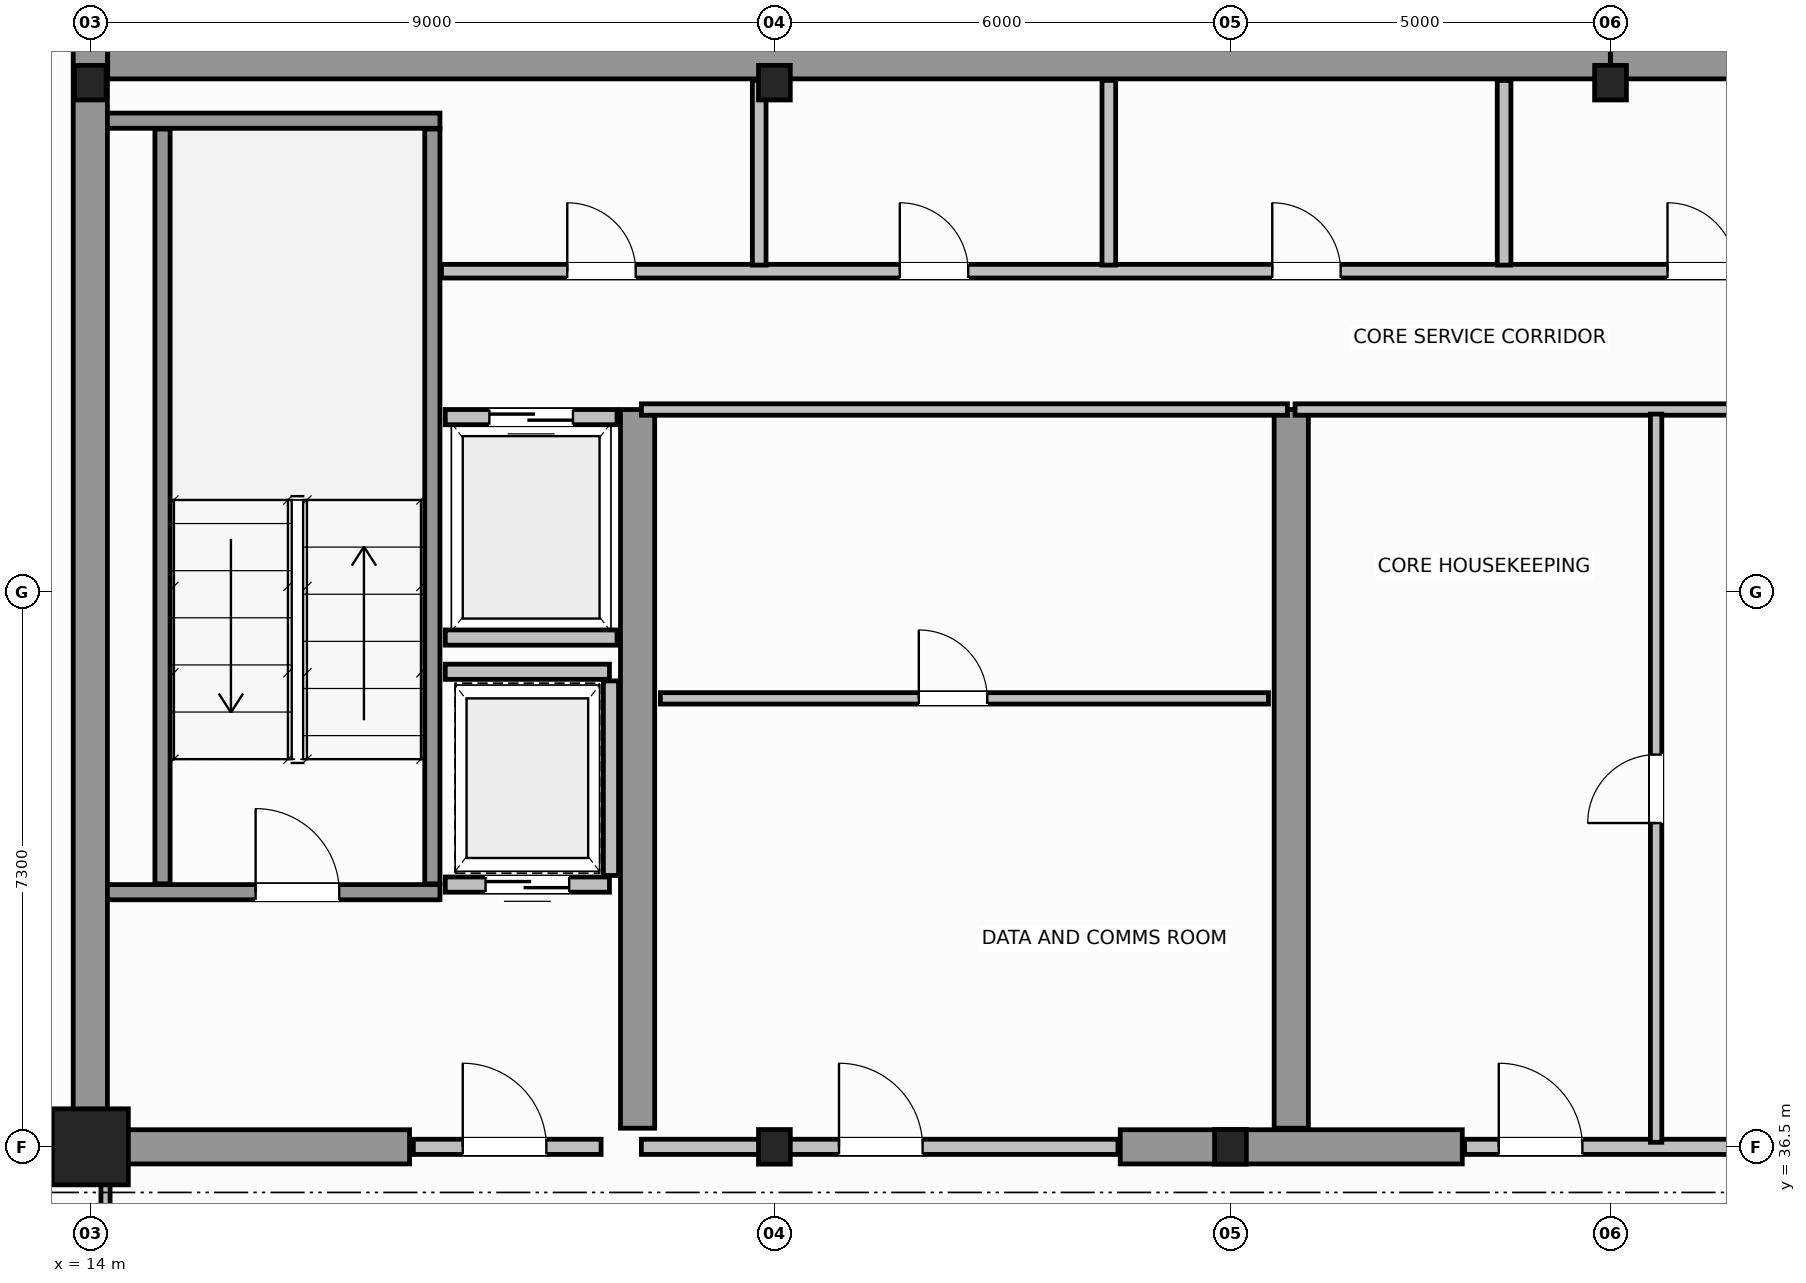
"""IFC4 building model, lengths in metres.
Left out: names, types, materials, properties, quantities, classifications, styles, units other than length and angle.
Written with IfcOpenShell. Run it as: python <this file> out.ifc"""

import sys

from ifc_helpers import new_model, si_unit, direction, frame, frame_2d, origin, origin_2d, place, context, subcontext, project, spatial, rectangle, i_section, extrude, source, transform, mapped, element, fill, save


model = new_model("IFC4")
c1 = context("Model", 3, precision=1e-05, world=origin(), true_north=direction((0.0, 1.0)))
c2 = subcontext(c1, "Body", "Model", "MODEL_VIEW")
j1 = project(units=[si_unit("LENGTHUNIT", "METRE"), si_unit("PLANEANGLEUNIT", "RADIAN")], contexts=[c1])
p1 = place(None, origin())
s1 = spatial("IfcSite", under=j1, at=p1, CompositionType="ELEMENT")
p2 = place(p1, origin())
s2 = spatial("IfcBuilding", under=s1, at=p2, CompositionType="ELEMENT")
p3 = place(p2, frame((0.0, 0.0, 249.8)))
s3 = spatial("IfcBuildingStorey", under=s2, at=p3, CompositionType="ELEMENT", Elevation=249.8)
m1 = source(origin(), c2, "Body", "SweptSolid", [
    extrude(rectangle(XDim=1.0, YDim=1.0, at=origin_2d()), origin(), (0.0, 0.0, 1.0), 3.8),
])
p4 = place(p3, frame((14.0, 36.5, 0.0), z_axis=(0.0, 0.0, 1.0), x_axis=(1.0, 0.0, 0.0)))
e1 = element("IfcColumn", 1, at=p4, inside=s3, PredefinedType="COLUMN", context=c2, shape_type="MappedRepresentation", body=[
    mapped(m1, transform((0.0, 0.0, 0.0), scale=1.0)),
])
m2 = source(origin(), c2, "Body", "SweptSolid", [
    extrude(i_section(OverallWidth=0.418, OverallDepth=0.455, WebThickness=0.042, FlangeThickness=0.058, FilletRadius=0.015, at=origin_2d()), origin(), (0.0, 0.0, 1.0), 3.8),
])
for number, where, z_axis, x_axis in (
    (2, (23.0, 36.5, 0.0), (0.0, 0.0, 1.0), (1.0, 0.0, 0.0)),
    (3, (29.0, 36.5, 0.0), (0.0, 0.0, 1.0), (1.0, 0.0, 0.0)),
    (4, (14.0, 50.5, 0.0), (0.0, 0.0, 1.0), (1.0, 0.0, 0.0)),
    (5, (23.0, 50.5, 0.0), (0.0, 0.0, 1.0), (1.0, 0.0, 0.0)),
    (6, (34.0, 50.5, 0.0), (0.0, 0.0, 1.0), (1.0, 0.0, 0.0)),
):
    element("IfcColumn", number, at=place(p3, frame(where, z_axis=z_axis, x_axis=x_axis)), inside=s3, PredefinedType="COLUMN", context=c2, shape_type="MappedRepresentation", body=[
        mapped(m2, transform((0.0, 0.0, 0.0), scale=1.0)),
    ])
for number, where, z_axis, x_axis in (
    (7, (14.229, 50.775, 0.0), (0.0, 0.0, 1.0), (1.0, 0.0, 0.0)),
    (8, (34.002, 50.775, 0.0), (0.0, 0.0, 1.0), (1.0, 0.0, 0.0)),
):
    element("IfcWall", number, at=place(p3, frame(where, z_axis=z_axis, x_axis=x_axis)), inside=s3, PredefinedType="SHEAR", context=c2, shape_type="SweptSolid", body=[
        extrude(rectangle(XDim=19.769, YDim=0.45, at=frame_2d((9.885, 0.0))), origin(), (0.0, 0.0, 1.0), 3.8),
    ])
p5 = place(p3, frame((14.0, 36.5, 0.0), z_axis=(0.0, 0.0, 1.0), x_axis=(0.0, 1.0, 0.0)))
e9 = element("IfcWall", 9, at=p5, inside=s3, PredefinedType="SHEAR", context=c2, shape_type="SweptSolid", body=[
    extrude(rectangle(XDim=14.5, YDim=0.45, at=frame_2d((7.25, 0.0))), origin(), (0.0, 0.0, 1.0), 3.8),
])
p6 = place(p3, frame((14.245, 36.5, 0.0), z_axis=(0.0, 0.0, 1.0), x_axis=(1.0, 0.0, 0.0)))
e10 = element("IfcWall", 10, at=p6, inside=s3, PredefinedType="SHEAR", context=c2, shape_type="SweptSolid", body=[
    extrude(rectangle(XDim=3.955, YDim=0.45, at=frame_2d((1.978, 0.0))), origin(), (0.0, 0.0, 1.0), 2.58),
])
p7 = place(p3, frame((27.55, 36.5, 0.0), z_axis=(0.0, 0.0, 1.0), x_axis=(1.0, 0.0, 0.0)))
e11 = element("IfcWall", 11, at=p7, inside=s3, PredefinedType="SHEAR", context=c2, shape_type="SweptSolid", body=[
    extrude(rectangle(XDim=4.5, YDim=0.45, at=frame_2d((2.25, 0.0))), origin(), (0.0, 0.0, 1.0), 3.8),
])
for number, where, z_axis, x_axis in (
    (12, (21.2, 36.745, 0.0), (0.0, 0.0, 1.0), (0.0, 1.0, 0.0)),
    (13, (29.8, 36.745, 0.0), (0.0, 0.0, 1.0), (0.0, 1.0, 0.0)),
):
    element("IfcWall", number, at=place(p3, frame(where, z_axis=z_axis, x_axis=x_axis)), inside=s3, PredefinedType="SHEAR", context=c2, shape_type="SweptSolid", body=[
        extrude(rectangle(XDim=9.455, YDim=0.45, at=frame_2d((4.728, 0.0))), origin(), (0.0, 0.0, 1.0), 3.8),
    ])
p8 = place(p3, frame((14.225, 39.85, 0.0), z_axis=(0.0, 0.0, 1.0), x_axis=(1.0, 0.0, 0.0)))
e14 = element("IfcWall", 14, at=p8, inside=s3, PredefinedType="SOLIDWALL", context=c2, shape_type="SweptSolid", body=[
    extrude(rectangle(XDim=4.375, YDim=0.2, at=frame_2d((2.188, 0.0))), origin(), (0.0, 0.0, 1.0), 3.8),
])
p9 = place(p8, frame((1.95, 0.0, 0.0)))
e15 = element("IfcOpeningElement", 15, at=p9, cuts=e14, PredefinedType="OPENING", context=c2, shape_type="SweptSolid", body=[
    extrude(rectangle(XDim=1.1, YDim=2.15, at=frame_2d((0.55, 1.075))), frame((0.0, 0.11, 0.0), z_axis=(0.0, -1.0, 0.0), x_axis=(1.0, 0.0, 0.0)), (0.0, 0.0, 1.0), 0.22),
])
p10 = place(p3, frame((14.225, 50.0, 0.0), z_axis=(0.0, 0.0, 1.0), x_axis=(1.0, 0.0, 0.0)))
e16 = element("IfcWall", 16, at=p10, inside=s3, PredefinedType="SOLIDWALL", context=c2, shape_type="SweptSolid", body=[
    extrude(rectangle(XDim=4.375, YDim=0.2, at=frame_2d((2.188, 0.0))), origin(), (0.0, 0.0, 1.0), 3.8),
])
for number, where, z_axis, x_axis in (
    (17, (14.95, 39.96, 0.0), (0.0, 0.0, 1.0), (0.0, 1.0, 0.0)),
    (18, (18.5, 39.96, 0.0), (0.0, 0.0, 1.0), (0.0, 1.0, 0.0)),
):
    element("IfcWall", number, at=place(p3, frame(where, z_axis=z_axis, x_axis=x_axis)), inside=s3, PredefinedType="SOLIDWALL", context=c2, shape_type="SweptSolid", body=[
        extrude(rectangle(XDim=9.93, YDim=0.2, at=frame_2d((4.965, 0.0))), origin(), (0.0, 0.0, 1.0), 3.8),
    ])
p11 = place(p3, frame((18.25, 36.5, 0.0), z_axis=(0.0, 0.0, 1.0), x_axis=(1.0, 0.0, 0.0)))
e19 = element("IfcWall", 19, at=p11, inside=s3, PredefinedType="SOLIDWALL", context=c2, shape_type="SweptSolid", body=[
    extrude(rectangle(XDim=2.47, YDim=0.2, at=frame_2d((1.235, 0.0))), origin(), (0.0, 0.0, 1.0), 2.57),
])
p12 = place(p11, frame((0.65, 0.0, 0.0)))
e20 = element("IfcOpeningElement", 20, at=p12, cuts=e19, PredefinedType="OPENING", context=c2, shape_type="SweptSolid", body=[
    extrude(rectangle(XDim=1.1, YDim=2.15, at=frame_2d((0.55, 1.075))), frame((0.0, 0.11, 0.0), z_axis=(0.0, -1.0, 0.0), x_axis=(1.0, 0.0, 0.0)), (0.0, 0.0, 1.0), 0.22),
])
p13 = place(p3, frame((18.67, 46.1, 0.0), z_axis=(0.0, 0.0, 1.0), x_axis=(1.0, 0.0, 0.0)))
e21 = element("IfcWall", 21, at=p13, inside=s3, PredefinedType="SOLIDWALL", context=c2, shape_type="SweptSolid", body=[
    extrude(rectangle(XDim=2.26, YDim=0.2, at=frame_2d((1.13, 0.0))), origin(), (0.0, 0.0, 1.0), 3.58),
])
p14 = place(p13, frame((0.58, 0.0, 0.0)))
e22 = element("IfcOpeningElement", 22, at=p14, cuts=e21, PredefinedType="OPENING", context=c2, shape_type="SweptSolid", body=[
    extrude(rectangle(XDim=1.1, YDim=2.15, at=frame_2d((0.55, 1.075))), frame((0.0, 0.11, 0.0), z_axis=(0.0, -1.0, 0.0), x_axis=(1.0, 0.0, 0.0)), (0.0, 0.0, 1.0), 0.22),
])
p15 = place(p3, frame((18.67, 43.2, 0.0), z_axis=(0.0, 0.0, 1.0), x_axis=(1.0, 0.0, 0.0)))
e23 = element("IfcWall", 23, at=p15, inside=s3, PredefinedType="SOLIDWALL", context=c2, shape_type="SweptSolid", body=[
    extrude(rectangle(XDim=2.26, YDim=0.2, at=frame_2d((1.13, 0.0))), origin(), (0.0, 0.0, 1.0), 3.58),
])
p16 = place(p3, frame((18.67, 39.95, 0.0), z_axis=(0.0, 0.0, 1.0), x_axis=(1.0, 0.0, 0.0)))
e24 = element("IfcWall", 24, at=p16, inside=s3, PredefinedType="SOLIDWALL", context=c2, shape_type="SweptSolid", body=[
    extrude(rectangle(XDim=2.16, YDim=0.2, at=frame_2d((1.08, 0.0))), origin(), (0.0, 0.0, 1.0), 3.58),
])
p17 = place(p16, frame((0.53, 0.0, 0.0)))
e25 = element("IfcOpeningElement", 25, at=p17, cuts=e24, PredefinedType="OPENING", context=c2, shape_type="SweptSolid", body=[
    extrude(rectangle(XDim=1.1, YDim=2.15, at=frame_2d((0.55, 1.075))), frame((0.0, 0.11, 0.0), z_axis=(0.0, -1.0, 0.0), x_axis=(1.0, 0.0, 0.0)), (0.0, 0.0, 1.0), 0.22),
])
p18 = place(p3, frame((18.67, 42.75, 0.0), z_axis=(0.0, 0.0, 1.0), x_axis=(1.0, 0.0, 0.0)))
e26 = element("IfcWall", 26, at=p18, inside=s3, PredefinedType="SOLIDWALL", context=c2, shape_type="SweptSolid", body=[
    extrude(rectangle(XDim=2.16, YDim=0.2, at=frame_2d((1.08, 0.0))), origin(), (0.0, 0.0, 1.0), 3.58),
])
p19 = place(p3, frame((20.85, 40.07, 0.0), z_axis=(0.0, 0.0, 1.0), x_axis=(0.0, 1.0, 0.0)))
e27 = element("IfcWall", 27, at=p19, inside=s3, PredefinedType="SOLIDWALL", context=c2, shape_type="SweptSolid", body=[
    extrude(rectangle(XDim=2.56, YDim=0.2, at=frame_2d((1.28, 0.0))), origin(), (0.0, 0.0, 1.0), 3.58),
])
p20 = place(p3, frame((21.25, 36.5, 0.0), z_axis=(0.0, 0.0, 1.0), x_axis=(1.0, 0.0, 0.0)))
e28 = element("IfcWall", 28, at=p20, inside=s3, PredefinedType="SOLIDWALL", context=c2, shape_type="SweptSolid", body=[
    extrude(rectangle(XDim=6.27, YDim=0.2, at=frame_2d((3.135, 0.0))), origin(), (0.0, 0.0, 1.0), 2.57),
])
p21 = place(p20, frame((2.6, 0.0, 0.0)))
e29 = element("IfcOpeningElement", 29, at=p21, cuts=e28, PredefinedType="OPENING", context=c2, shape_type="SweptSolid", body=[
    extrude(rectangle(XDim=1.1, YDim=2.15, at=frame_2d((0.55, 1.075))), frame((0.0, 0.11, 0.0), z_axis=(0.0, -1.0, 0.0), x_axis=(1.0, 0.0, 0.0)), (0.0, 0.0, 1.0), 0.22),
])
p22 = place(p3, frame((21.25, 46.2, 0.0), z_axis=(0.0, 0.0, 1.0), x_axis=(1.0, 0.0, 0.0)))
e30 = element("IfcWall", 30, at=p22, inside=s3, PredefinedType="PARTITIONING", context=c2, shape_type="SweptSolid", body=[
    extrude(rectangle(XDim=8.5, YDim=0.15, at=frame_2d((4.25, 0.0))), origin(), (0.0, 0.0, 1.0), 3.58),
])
p23 = place(p3, frame((21.5, 42.4, 0.0), z_axis=(0.0, 0.0, 1.0), x_axis=(1.0, 0.0, 0.0)))
e31 = element("IfcWall", 31, at=p23, inside=s3, PredefinedType="PARTITIONING", context=c2, shape_type="SweptSolid", body=[
    extrude(rectangle(XDim=8.0, YDim=0.15, at=frame_2d((4.0, 0.0))), origin(), (0.0, 0.0, 1.0), 3.58),
])
p24 = place(p23, frame((3.4, 0.0, 0.0)))
e32 = element("IfcOpeningElement", 32, at=p24, cuts=e31, PredefinedType="OPENING", context=c2, shape_type="SweptSolid", body=[
    extrude(rectangle(XDim=0.9, YDim=2.1, at=frame_2d((0.45, 1.05))), frame((0.0, 0.085, 0.0), z_axis=(0.0, -1.0, 0.0), x_axis=(1.0, 0.0, 0.0)), (0.0, 0.0, 1.0), 0.17),
])
p25 = place(p3, frame((32.08, 36.5, 0.0), z_axis=(0.0, 0.0, 1.0), x_axis=(1.0, 0.0, 0.0)))
e33 = element("IfcWall", 33, at=p25, inside=s3, PredefinedType="SOLIDWALL", context=c2, shape_type="SweptSolid", body=[
    extrude(rectangle(XDim=4.04, YDim=0.2, at=frame_2d((2.02, 0.0))), origin(), (0.0, 0.0, 1.0), 3.02),
])
p26 = place(p25, frame((0.45, 0.0, 0.0)))
e34 = element("IfcOpeningElement", 34, at=p26, cuts=e33, PredefinedType="OPENING", context=c2, shape_type="SweptSolid", body=[
    extrude(rectangle(XDim=1.1, YDim=2.15, at=frame_2d((0.55, 1.075))), frame((0.0, 0.11, 0.0), z_axis=(0.0, -1.0, 0.0), x_axis=(1.0, 0.0, 0.0)), (0.0, 0.0, 1.0), 0.22),
])
p27 = place(p3, frame((29.85, 46.2, 0.0), z_axis=(0.0, 0.0, 1.0), x_axis=(1.0, 0.0, 0.0)))
e35 = element("IfcWall", 35, at=p27, inside=s3, PredefinedType="PARTITIONING", context=c2, shape_type="SweptSolid", body=[
    extrude(rectangle(XDim=8.5, YDim=0.15, at=frame_2d((4.25, 0.0))), origin(), (0.0, 0.0, 1.0), 3.58),
])
p28 = place(p3, frame((34.6, 36.56, 0.0), z_axis=(0.0, 0.0, 1.0), x_axis=(0.0, 1.0, 0.0)))
e36 = element("IfcWall", 36, at=p28, inside=s3, PredefinedType="PARTITIONING", context=c2, shape_type="SweptSolid", body=[
    extrude(rectangle(XDim=9.58, YDim=0.15, at=frame_2d((4.79, 0.0))), origin(), (0.0, 0.0, 1.0), 3.58),
])
p29 = place(p28, frame((4.2, 0.0, 0.0)))
e37 = element("IfcOpeningElement", 37, at=p29, cuts=e36, PredefinedType="OPENING", context=c2, shape_type="SweptSolid", body=[
    extrude(rectangle(XDim=0.9, YDim=2.1, at=frame_2d((0.45, 1.05))), frame((0.0, 0.085, 0.0), z_axis=(0.0, -1.0, 0.0), x_axis=(1.0, 0.0, 0.0)), (0.0, 0.0, 1.0), 0.17),
])
p30 = place(p3, frame((18.62, 48.02, 0.0), z_axis=(0.0, 0.0, 1.0), x_axis=(1.0, 0.0, 0.0)))
e38 = element("IfcWall", 38, at=p30, inside=s3, PredefinedType="PLUMBINGWALL", context=c2, shape_type="SweptSolid", body=[
    extrude(rectangle(XDim=30.76, YDim=0.18, at=frame_2d((15.38, 0.0))), origin(), (0.0, 0.0, 1.0), 3.58),
])
p31 = place(p30, frame((1.655, 0.0, 0.0)))
e39 = element("IfcOpeningElement", 39, at=p31, cuts=e38, PredefinedType="OPENING", context=c2, shape_type="SweptSolid", body=[
    extrude(rectangle(XDim=0.9, YDim=2.15, at=frame_2d((0.45, 1.075))), frame((0.0, 0.1, 0.0), z_axis=(0.0, -1.0, 0.0), x_axis=(1.0, 0.0, 0.0)), (0.0, 0.0, 1.0), 0.2),
])
p32 = place(p30, frame((6.03, 0.0, 0.0)))
e40 = element("IfcOpeningElement", 40, at=p32, cuts=e38, PredefinedType="OPENING", context=c2, shape_type="SweptSolid", body=[
    extrude(rectangle(XDim=0.9, YDim=2.15, at=frame_2d((0.45, 1.075))), frame((0.0, 0.1, 0.0), z_axis=(0.0, -1.0, 0.0), x_axis=(1.0, 0.0, 0.0)), (0.0, 0.0, 1.0), 0.2),
])
p33 = place(p30, frame((10.93, 0.0, 0.0)))
e41 = element("IfcOpeningElement", 41, at=p33, cuts=e38, PredefinedType="OPENING", context=c2, shape_type="SweptSolid", body=[
    extrude(rectangle(XDim=0.9, YDim=2.15, at=frame_2d((0.45, 1.075))), frame((0.0, 0.1, 0.0), z_axis=(0.0, -1.0, 0.0), x_axis=(1.0, 0.0, 0.0)), (0.0, 0.0, 1.0), 0.2),
])
p34 = place(p30, frame((16.13, 0.0, 0.0)))
e42 = element("IfcOpeningElement", 42, at=p34, cuts=e38, PredefinedType="OPENING", context=c2, shape_type="SweptSolid", body=[
    extrude(rectangle(XDim=0.9, YDim=2.15, at=frame_2d((0.45, 1.075))), frame((0.0, 0.1, 0.0), z_axis=(0.0, -1.0, 0.0), x_axis=(1.0, 0.0, 0.0)), (0.0, 0.0, 1.0), 0.2),
])
p35 = place(p30, frame((21.73, 0.0, 0.0)))
e43 = element("IfcOpeningElement", 43, at=p35, cuts=e38, PredefinedType="OPENING", context=c2, shape_type="SweptSolid", body=[
    extrude(rectangle(XDim=0.9, YDim=2.15, at=frame_2d((0.45, 1.075))), frame((0.0, 0.1, 0.0), z_axis=(0.0, -1.0, 0.0), x_axis=(1.0, 0.0, 0.0)), (0.0, 0.0, 1.0), 0.2),
])
p36 = place(p30, frame((27.505, 0.0, 0.0)))
e44 = element("IfcOpeningElement", 44, at=p36, cuts=e38, PredefinedType="OPENING", context=c2, shape_type="SweptSolid", body=[
    extrude(rectangle(XDim=0.9, YDim=2.15, at=frame_2d((0.45, 1.075))), frame((0.0, 0.1, 0.0), z_axis=(0.0, -1.0, 0.0), x_axis=(1.0, 0.0, 0.0)), (0.0, 0.0, 1.0), 0.2),
])
p37 = place(p3, frame((22.8, 48.1, 0.0), z_axis=(0.0, 0.0, 1.0), x_axis=(0.0, 1.0, 0.0)))
e45 = element("IfcWall", 45, at=p37, inside=s3, PredefinedType="PLUMBINGWALL", context=c2, shape_type="SweptSolid", body=[
    extrude(rectangle(XDim=2.43, YDim=0.18, at=frame_2d((1.215, 0.0))), origin(), (0.0, 0.0, 1.0), 3.02),
])
for number, where, z_axis, x_axis in (
    (46, (27.4, 48.1, 0.0), (0.0, 0.0, 1.0), (0.0, 1.0, 0.0)),
    (47, (32.6, 48.1, 0.0), (0.0, 0.0, 1.0), (0.0, 1.0, 0.0)),
):
    element("IfcWall", number, at=place(p3, frame(where, z_axis=z_axis, x_axis=x_axis)), inside=s3, PredefinedType="PLUMBINGWALL", context=c2, shape_type="SweptSolid", body=[
        extrude(rectangle(XDim=2.43, YDim=0.18, at=frame_2d((1.215, 0.0))), origin(), (0.0, 0.0, 1.0), 3.58),
    ])
p38 = place(p3, frame((14.2, 34.16, 0.0), z_axis=(0.0, 0.0, 1.0), x_axis=(0.0, 1.0, 0.0)))
e48 = element("IfcWall", 48, at=p38, inside=s3, PredefinedType="PARTITIONING", context=c2, shape_type="SweptSolid", body=[
    extrude(rectangle(XDim=2.28, YDim=0.12, at=frame_2d((1.14, 0.0))), origin(), (0.0, 0.0, 1.0), 3.58),
])
p39 = place(p38, frame((0.65, 0.0, 0.0)))
e49 = element("IfcOpeningElement", 49, at=p39, cuts=e48, PredefinedType="OPENING", context=c2, shape_type="SweptSolid", body=[
    extrude(rectangle(XDim=0.9, YDim=2.15, at=frame_2d((0.45, 1.075))), frame((0.0, 0.07, 0.0), z_axis=(0.0, -1.0, 0.0), x_axis=(1.0, 0.0, 0.0)), (0.0, 0.0, 1.0), 0.14),
])
m3 = source(origin(), c2, "Body", "SweptSolid", [
    extrude(rectangle(XDim=1.1, YDim=2.15, at=frame_2d((0.55, 1.075))), frame((0.0, 0.025, 0.0), z_axis=(0.0, -1.0, 0.0), x_axis=(1.0, 0.0, 0.0)), (0.0, 0.0, 1.0), 0.05),
])
p40 = place(p9, origin())
e50 = element("IfcDoor", 50, at=p40, inside=s3, OperationType="SINGLE_SWING_LEFT", PredefinedType="DOOR", context=c2, shape_type="MappedRepresentation", body=[
    mapped(m3, transform((0.0, 0.0, 0.0), scale=1.0)),
])
fill(e15, e50)
p41 = place(p12, origin())
e51 = element("IfcDoor", 51, at=p41, inside=s3, OperationType="SINGLE_SWING_RIGHT", PredefinedType="DOOR", context=c2, shape_type="MappedRepresentation", body=[
    mapped(m3, transform((0.0, 0.0, 0.0), scale=1.0)),
])
fill(e20, e51)
p42 = place(p14, origin())
e52 = element("IfcDoor", 52, at=p42, inside=s3, OperationType="DOUBLE_DOOR_SLIDING", PredefinedType="DOOR", context=c2, shape_type="MappedRepresentation", body=[
    mapped(m3, transform((0.0, 0.0, 0.0), scale=1.0)),
])
fill(e22, e52)
p43 = place(p17, origin())
e53 = element("IfcDoor", 53, at=p43, inside=s3, OperationType="DOUBLE_DOOR_SLIDING", PredefinedType="DOOR", context=c2, shape_type="MappedRepresentation", body=[
    mapped(m3, transform((0.0, 0.0, 0.0), scale=1.0)),
])
fill(e25, e53)
p44 = place(p21, origin())
e54 = element("IfcDoor", 54, at=p44, inside=s3, OperationType="SINGLE_SWING_LEFT", PredefinedType="DOOR", context=c2, shape_type="MappedRepresentation", body=[
    mapped(m3, transform((0.0, 0.0, 0.0), scale=1.0)),
])
fill(e29, e54)
m4 = source(origin(), c2, "Body", "SweptSolid", [
    extrude(rectangle(XDim=0.9, YDim=2.1, at=frame_2d((0.45, 1.05))), frame((0.0, 0.025, 0.0), z_axis=(0.0, -1.0, 0.0), x_axis=(1.0, 0.0, 0.0)), (0.0, 0.0, 1.0), 0.05),
])
p45 = place(p24, origin())
e55 = element("IfcDoor", 55, at=p45, inside=s3, OperationType="SINGLE_SWING_RIGHT", PredefinedType="DOOR", context=c2, shape_type="MappedRepresentation", body=[
    mapped(m4, transform((0.0, 0.0, 0.0), scale=1.0)),
])
fill(e32, e55)
p46 = place(p26, origin())
e56 = element("IfcDoor", 56, at=p46, inside=s3, OperationType="SINGLE_SWING_LEFT", PredefinedType="DOOR", context=c2, shape_type="MappedRepresentation", body=[
    mapped(m3, transform((0.0, 0.0, 0.0), scale=1.0)),
])
fill(e34, e56)
p47 = place(p29, origin())
e57 = element("IfcDoor", 57, at=p47, inside=s3, OperationType="SINGLE_SWING_RIGHT", PredefinedType="DOOR", context=c2, shape_type="MappedRepresentation", body=[
    mapped(m4, transform((0.0, 0.0, 0.0), scale=1.0)),
])
fill(e37, e57)
m5 = source(origin(), c2, "Body", "SweptSolid", [
    extrude(rectangle(XDim=0.9, YDim=2.15, at=frame_2d((0.45, 1.075))), frame((0.0, 0.025, 0.0), z_axis=(0.0, -1.0, 0.0), x_axis=(1.0, 0.0, 0.0)), (0.0, 0.0, 1.0), 0.05),
])
p48 = place(p31, origin())
e58 = element("IfcDoor", 58, at=p48, inside=s3, OperationType="SINGLE_SWING_LEFT", PredefinedType="DOOR", context=c2, shape_type="MappedRepresentation", body=[
    mapped(m5, transform((0.0, 0.0, 0.0), scale=1.0)),
])
fill(e39, e58)
p49 = place(p32, origin())
e59 = element("IfcDoor", 59, at=p49, inside=s3, OperationType="SINGLE_SWING_RIGHT", PredefinedType="DOOR", context=c2, shape_type="MappedRepresentation", body=[
    mapped(m5, transform((0.0, 0.0, 0.0), scale=1.0)),
])
fill(e40, e59)
p50 = place(p33, origin())
e60 = element("IfcDoor", 60, at=p50, inside=s3, OperationType="SINGLE_SWING_LEFT", PredefinedType="DOOR", context=c2, shape_type="MappedRepresentation", body=[
    mapped(m5, transform((0.0, 0.0, 0.0), scale=1.0)),
])
fill(e41, e60)
p51 = place(p34, origin())
e61 = element("IfcDoor", 61, at=p51, inside=s3, OperationType="SINGLE_SWING_RIGHT", PredefinedType="DOOR", context=c2, shape_type="MappedRepresentation", body=[
    mapped(m5, transform((0.0, 0.0, 0.0), scale=1.0)),
])
fill(e42, e61)
save(model, sys.argv[1])
